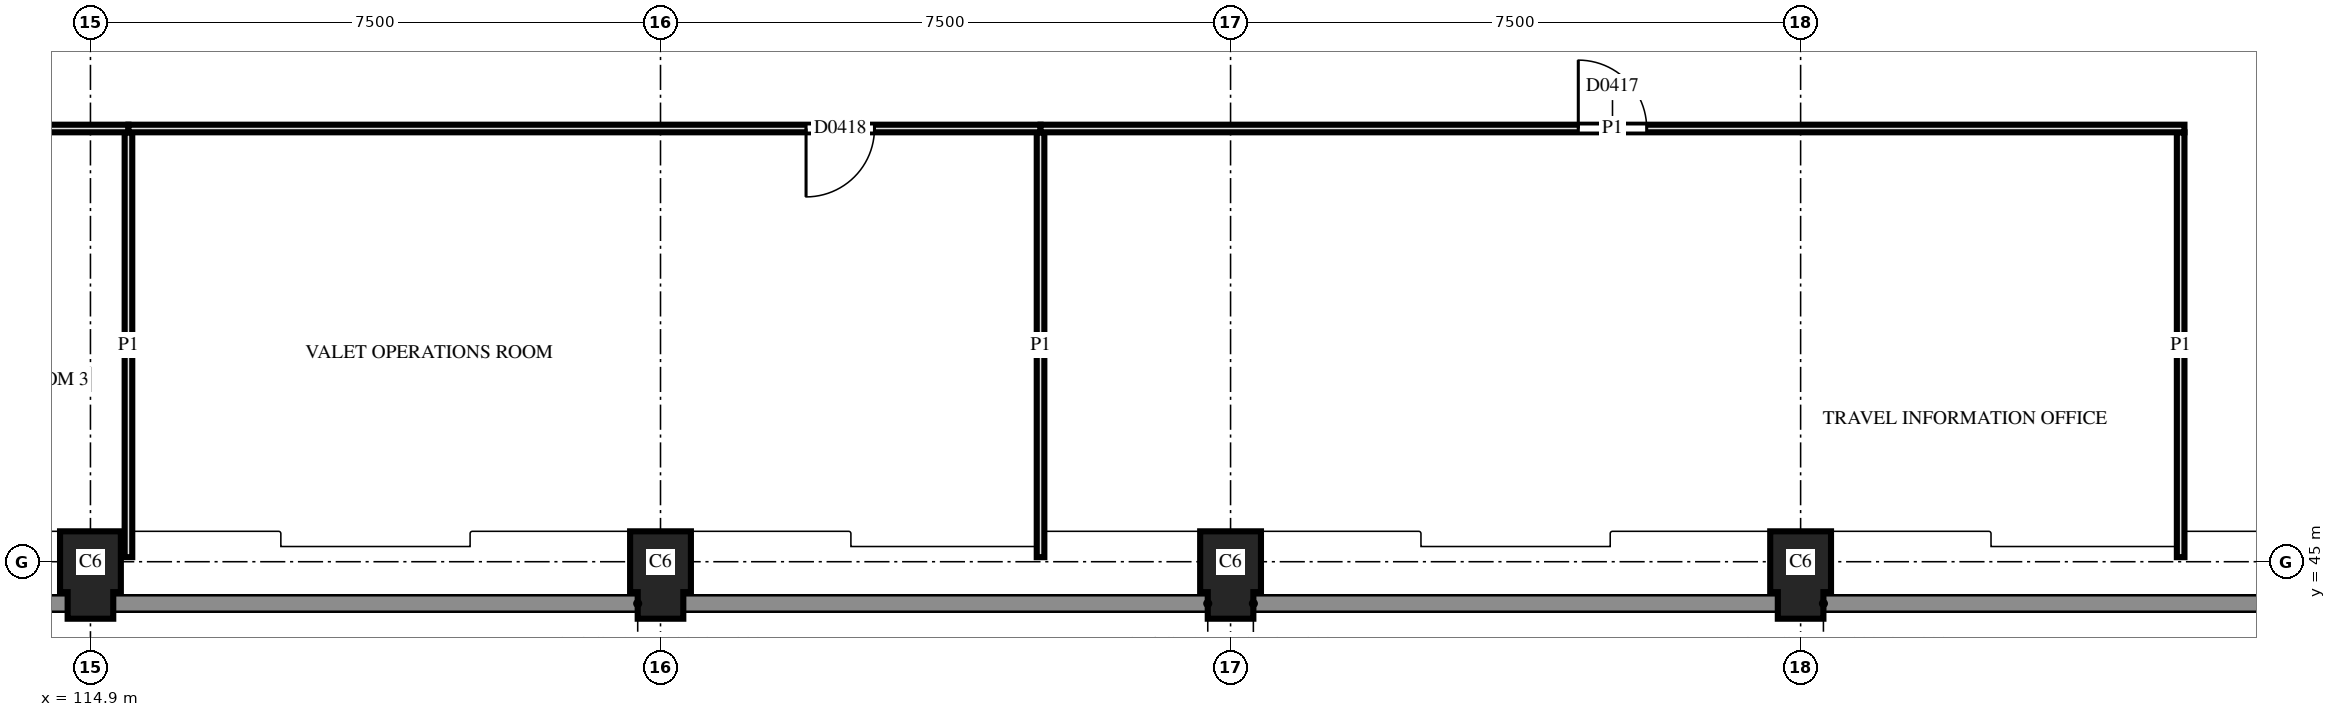
"""IFC4 building model, lengths in metres.
Left out: names, types, materials, properties, quantities, classifications, styles, units other than length and angle.
Written with IfcOpenShell. Run it as: python <this file> out.ifc"""

import sys

from ifc_helpers import new_model, si_unit, direction, frame, frame_2d, origin, place, context, subcontext, project, spatial, polyline, rectangle, outline, extrude, element, fill, save


model = new_model("IFC4")
c1 = context("Model", 3, precision=1e-05, world=origin(), true_north=direction((0.0, 1.0)))
c2 = subcontext(c1, "Body", "Model", "MODEL_VIEW")
j1 = project(units=[si_unit("LENGTHUNIT", "METRE"), si_unit("PLANEANGLEUNIT", "RADIAN")], contexts=[c1])
p1 = place(None, origin())
s1 = spatial("IfcSite", under=j1, at=p1, CompositionType="ELEMENT")
p2 = place(p1, origin())
s2 = spatial("IfcBuilding", under=s1, at=p2, CompositionType="ELEMENT")
p3 = place(p2, frame((0.0, 0.0, 15.6)))
s3 = spatial("IfcBuildingStorey", under=s2, at=p3, CompositionType="ELEMENT", Elevation=15.6)
for number, where, z_axis, x_axis in (
    (1, (114.9, 45.0, 0.0), (0.0, 0.0, 1.0), (0.0, -1.0, 0.0)),
    (2, (122.4, 45.0, 0.0), (0.0, 0.0, 1.0), (0.0, -1.0, 0.0)),
    (3, (129.9, 45.0, 0.0), (0.0, 0.0, 1.0), (0.0, -1.0, 0.0)),
    (4, (137.4, 45.0, 0.0), (0.0, 0.0, 1.0), (0.0, -1.0, 0.0)),
):
    element("IfcColumn", number, at=place(p3, frame(where, z_axis=z_axis, x_axis=x_axis)), inside=s3, PredefinedType="COLUMN", context=c2, shape_type="SweptSolid", body=[
        extrude(outline(polyline([(-0.4, -0.4), (0.4, -0.4), (0.4, -0.3), (0.75, -0.3), (0.75, 0.3), (0.4, 0.3), (0.4, 0.4), (-0.4, 0.4), (-0.4, -0.4)])), origin(), (0.0, 0.0, 1.0), 3.7),
    ])
for number, where, z_axis, x_axis in (
    (5, (142.4, 45.06, 0.0), (0.0, 0.0, 1.0), (0.0, 1.0, 0.0)),
    (6, (115.4, 50.65, 0.0), (0.0, 0.0, 1.0), (0.0, -1.0, 0.0)),
):
    element("IfcWall", number, at=place(p3, frame(where, z_axis=z_axis, x_axis=x_axis)), inside=s3, PredefinedType="PARTITIONING", context=c2, shape_type="SweptSolid", body=[
        extrude(rectangle(XDim=5.59, YDim=0.1, at=frame_2d((2.795, 0.0))), origin(), (0.0, 0.0, 1.0), 2.88),
    ])
p4 = place(p3, frame((115.4, 50.7, 0.0), z_axis=(0.0, 0.0, 1.0), x_axis=(-1.0, 0.0, 0.0)))
e7 = element("IfcWall", 7, at=p4, inside=s3, PredefinedType="PARTITIONING", context=c2, shape_type="SweptSolid", body=[
    extrude(rectangle(XDim=10.0, YDim=0.1, at=frame_2d((5.0, 0.0))), origin(), (0.0, 0.0, 1.0), 2.88),
])
p5 = place(p4, frame((4.55, 0.0, 0.0)))
e8 = element("IfcOpeningElement", 8, at=p5, cuts=e7, PredefinedType="OPENING", context=c2, shape_type="SweptSolid", body=[
    extrude(rectangle(XDim=0.9, YDim=2.1, at=frame_2d((0.45, 1.05))), frame((0.0, 0.06, 0.0), z_axis=(0.0, -1.0, 0.0), x_axis=(1.0, 0.0, 0.0)), (0.0, 0.0, 1.0), 0.12),
])
p6 = place(p3, frame((127.4, 50.65, 0.0), z_axis=(0.0, 0.0, 1.0), x_axis=(0.0, -1.0, 0.0)))
e9 = element("IfcWall", 9, at=p6, inside=s3, PredefinedType="PARTITIONING", context=c2, shape_type="SweptSolid", body=[
    extrude(rectangle(XDim=5.59, YDim=0.1, at=frame_2d((2.795, 0.0))), origin(), (0.0, 0.0, 1.0), 2.88),
])
p7 = place(p3, frame((127.4, 50.7, 0.0), z_axis=(0.0, 0.0, 1.0), x_axis=(-1.0, 0.0, 0.0)))
e10 = element("IfcWall", 10, at=p7, inside=s3, PredefinedType="PARTITIONING", context=c2, shape_type="SweptSolid", body=[
    extrude(rectangle(XDim=12.0, YDim=0.1, at=frame_2d((6.0, 0.0))), origin(), (0.0, 0.0, 1.0), 2.88),
])
p8 = place(p7, frame((2.185, 0.0, 0.0)))
e11 = element("IfcOpeningElement", 11, at=p8, cuts=e10, PredefinedType="OPENING", context=c2, shape_type="SweptSolid", body=[
    extrude(rectangle(XDim=0.9, YDim=2.1, at=frame_2d((0.45, 1.05))), frame((0.0, 0.06, 0.0), z_axis=(0.0, -1.0, 0.0), x_axis=(1.0, 0.0, 0.0)), (0.0, 0.0, 1.0), 0.12),
])
p9 = place(p3, frame((142.45, 50.7, 0.0), z_axis=(0.0, 0.0, 1.0), x_axis=(-1.0, 0.0, 0.0)))
e12 = element("IfcWall", 12, at=p9, inside=s3, PredefinedType="PARTITIONING", context=c2, shape_type="SweptSolid", body=[
    extrude(rectangle(XDim=15.05, YDim=0.1, at=frame_2d((7.525, 0.0))), origin(), (0.0, 0.0, 1.0), 2.88),
])
p10 = place(p9, frame((7.075, 0.0, 0.0)))
e13 = element("IfcOpeningElement", 13, at=p10, cuts=e12, PredefinedType="OPENING", context=c2, shape_type="SweptSolid", body=[
    extrude(rectangle(XDim=0.9, YDim=2.1, at=frame_2d((0.45, 1.05))), frame((0.0, 0.06, 0.0), z_axis=(0.0, -1.0, 0.0), x_axis=(1.0, 0.0, 0.0)), (0.0, 0.0, 1.0), 0.12),
])
p11 = place(p10, origin())
e14 = element("IfcDoor", 14, at=p11, inside=s3, OperationType="SINGLE_SWING_RIGHT", PredefinedType="DOOR", context=c2, shape_type="SweptSolid", body=[
    extrude(rectangle(XDim=0.9, YDim=2.1, at=frame_2d((0.45, 1.05))), frame((0.0, 0.025, 0.0), z_axis=(0.0, -1.0, 0.0), x_axis=(1.0, 0.0, 0.0)), (0.0, 0.0, 1.0), 0.05),
])
fill(e13, e14)
p12 = place(p8, origin())
e15 = element("IfcDoor", 15, at=p12, inside=s3, OperationType="SINGLE_SWING_LEFT", PredefinedType="DOOR", context=c2, shape_type="SweptSolid", body=[
    extrude(rectangle(XDim=0.9, YDim=2.1, at=frame_2d((0.45, 1.05))), frame((0.0, 0.025, 0.0), z_axis=(0.0, -1.0, 0.0), x_axis=(1.0, 0.0, 0.0)), (0.0, 0.0, 1.0), 0.05),
])
fill(e11, e15)
save(model, sys.argv[1])
